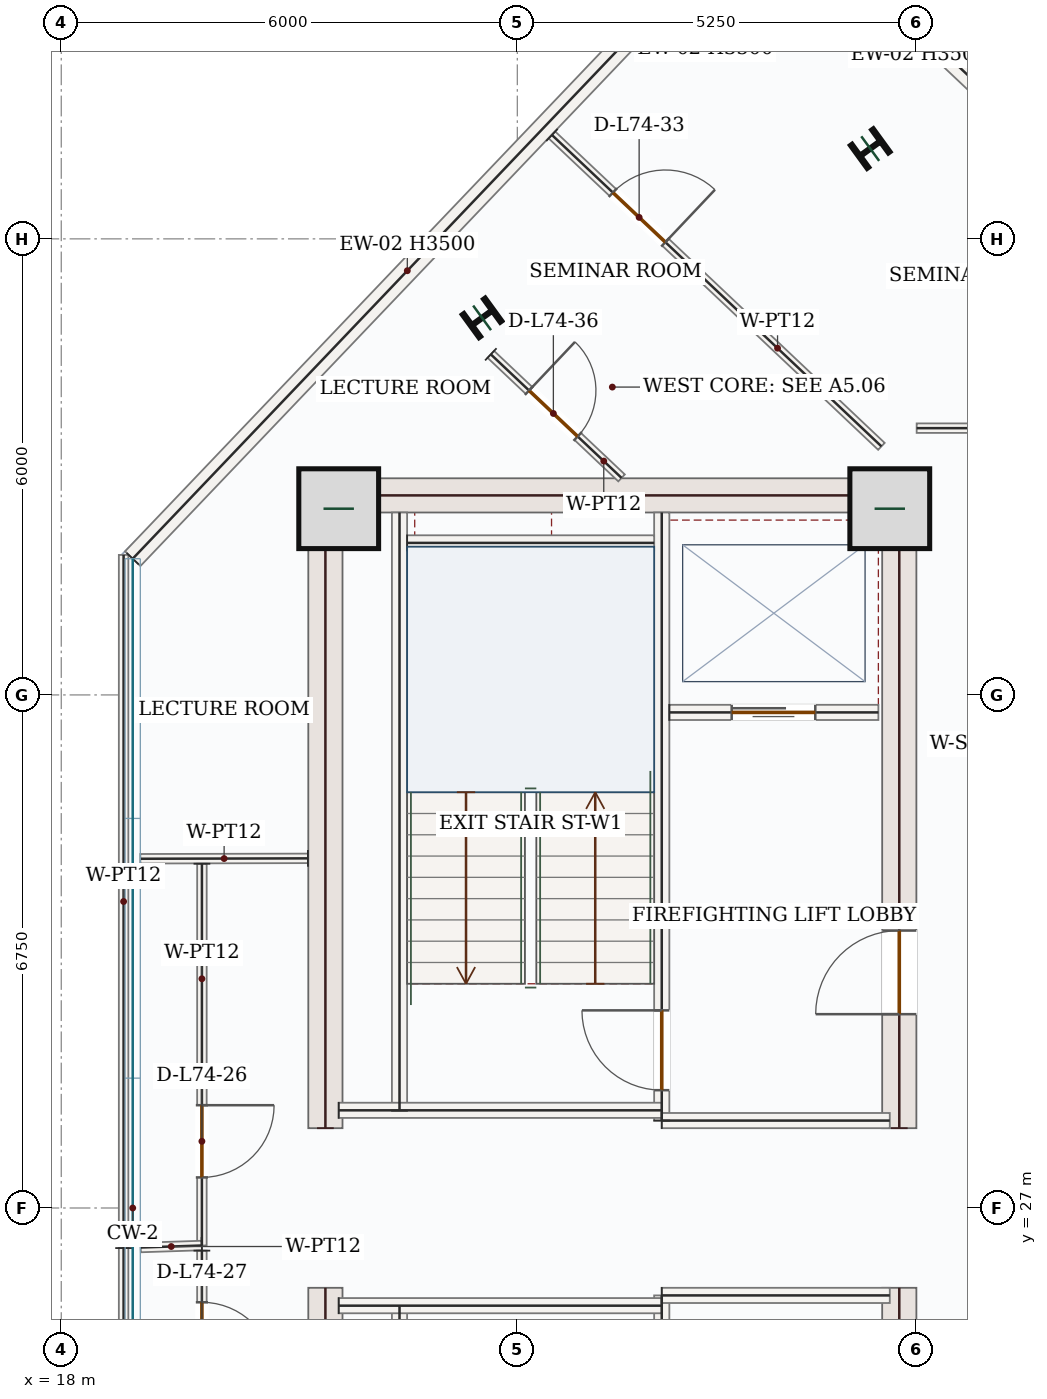
"""IFC4 building model, lengths in metres.
Left out: names, types, materials, properties, quantities, classifications, styles, units other than length and angle.
Written with IfcOpenShell. Run it as: python <this file> out.ifc"""

import sys

from ifc_helpers import new_model, si_unit, direction, frame, frame_2d, origin, origin_2d, place, context, subcontext, project, spatial, rectangle, i_section, extrude, source, transform, mapped, element, fill, save


model = new_model("IFC4")
c1 = context("Model", 3, precision=1e-05, world=origin(), true_north=direction((0.0, 1.0)))
c2 = subcontext(c1, "Body", "Model", "MODEL_VIEW")
j1 = project(units=[si_unit("LENGTHUNIT", "METRE"), si_unit("PLANEANGLEUNIT", "RADIAN")], contexts=[c1])
p1 = place(None, origin())
s1 = spatial("IfcSite", under=j1, at=p1, CompositionType="ELEMENT")
p2 = place(p1, origin())
s2 = spatial("IfcBuilding", under=s1, at=p2, CompositionType="ELEMENT")
p3 = place(p2, frame((0.0, 0.0, 306.6)))
s3 = spatial("IfcBuildingStorey", under=s2, at=p3, CompositionType="ELEMENT", Elevation=306.6)
m1 = source(origin(), c2, "Body", "SweptSolid", [
    extrude(rectangle(XDim=8.55, YDim=0.45, at=frame_2d((4.275, 0.0))), origin(), (0.0, 0.0, 1.0), 3.5),
])
for number, where, z_axis, x_axis in (
    (1, (21.475, 17.4, 0.0), (0.0, 0.0, 1.0), (0.0, 1.0, 0.0)),
    (2, (21.475, 28.05, 0.0), (0.0, 0.0, 1.0), (0.0, 1.0, 0.0)),
):
    element("IfcWall", number, at=place(p3, frame(where, z_axis=z_axis, x_axis=x_axis)), inside=s3, PredefinedType="SHEAR", context=c2, shape_type="MappedRepresentation", body=[
        mapped(m1, transform((0.0, 0.0, 0.0), x_axis=(1.0, 0.0, 0.0), y_axis=(0.0, 1.0, 0.0), z_axis=(0.0, 0.0, 1.0), scale=1.0)),
    ])
p4 = place(p3, frame((29.025, 17.4, 0.0), z_axis=(0.0, 0.0, 1.0), x_axis=(0.0, 1.0, 0.0)))
e3 = element("IfcWall", 3, at=p4, inside=s3, PredefinedType="SHEAR", context=c2, shape_type="SweptSolid", body=[
    extrude(rectangle(XDim=8.55, YDim=0.45, at=frame_2d((4.275, 0.0))), origin(), (0.0, 0.0, 1.0), 3.5),
])
p5 = place(p4, frame((6.65, 0.0, 0.0)))
e4 = element("IfcOpeningElement", 4, at=p5, cuts=e3, PredefinedType="OPENING", context=c2, shape_type="SweptSolid", body=[
    extrude(rectangle(XDim=1.1, YDim=2.2, at=frame_2d((0.55, 1.1))), frame((0.0, 0.235, 0.0), z_axis=(0.0, -1.0, 0.0), x_axis=(1.0, 0.0, 0.0)), (0.0, 0.0, 1.0), 0.47),
])
p6 = place(p4, frame((2.7, 0.0, 0.0)))
e5 = element("IfcOpeningElement", 5, at=p6, cuts=e3, PredefinedType="OPENING", context=c2, shape_type="SweptSolid", body=[
    extrude(rectangle(XDim=0.88, YDim=2.1, at=frame_2d((0.44, 1.05))), frame((0.0, 0.235, 0.0), z_axis=(0.0, -1.0, 0.0), x_axis=(1.0, 0.0, 0.0)), (0.0, 0.0, 1.0), 0.47),
])
p7 = place(p4, frame((4.6, 0.0, 0.0)))
e6 = element("IfcOpeningElement", 6, at=p7, cuts=e3, PredefinedType="OPENING", context=c2, shape_type="SweptSolid", body=[
    extrude(rectangle(XDim=0.88, YDim=2.1, at=frame_2d((0.44, 1.05))), frame((0.0, 0.235, 0.0), z_axis=(0.0, -1.0, 0.0), x_axis=(1.0, 0.0, 0.0)), (0.0, 0.0, 1.0), 0.47),
])
p8 = place(p3, frame((29.025, 28.05, 0.0), z_axis=(0.0, 0.0, 1.0), x_axis=(0.0, 1.0, 0.0)))
e7 = element("IfcWall", 7, at=p8, inside=s3, PredefinedType="SHEAR", context=c2, shape_type="SweptSolid", body=[
    extrude(rectangle(XDim=8.55, YDim=0.45, at=frame_2d((4.275, 0.0))), origin(), (0.0, 0.0, 1.0), 3.5),
])
p9 = place(p8, frame((1.5, 0.0, 0.0)))
e8 = element("IfcOpeningElement", 8, at=p9, cuts=e7, PredefinedType="OPENING", context=c2, shape_type="SweptSolid", body=[
    extrude(rectangle(XDim=1.1, YDim=2.2, at=frame_2d((0.55, 1.1))), frame((0.0, 0.235, 0.0), z_axis=(0.0, -1.0, 0.0), x_axis=(1.0, 0.0, 0.0)), (0.0, 0.0, 1.0), 0.47),
])
m2 = source(origin(), c2, "Body", "SweptSolid", [
    extrude(rectangle(XDim=7.1, YDim=0.45, at=frame_2d((3.55, 0.0))), origin(), (0.0, 0.0, 1.0), 3.5),
])
p10 = place(p3, frame((21.7, 36.375, 0.0), z_axis=(0.0, 0.0, 1.0), x_axis=(1.0, 0.0, 0.0)))
e9 = element("IfcWall", 9, at=p10, inside=s3, PredefinedType="SHEAR", context=c2, shape_type="MappedRepresentation", body=[
    mapped(m2, transform((0.0, 0.0, 0.0), x_axis=(1.0, 0.0, 0.0), y_axis=(0.0, 1.0, 0.0), z_axis=(0.0, 0.0, 1.0), scale=1.0)),
])
m3 = source(origin(), c2, "Body", "SweptSolid", [
    extrude(rectangle(XDim=1.05, YDim=1.05, at=origin_2d()), origin(), (0.0, 0.0, 1.0), 3.75),
])
for number, where, z_axis, x_axis in (
    (10, (21.65, 36.2, 0.0), (0.0, 0.0, 1.0), (1.0, 0.0, 0.0)),
    (11, (28.9, 36.2, 0.0), (0.0, 0.0, 1.0), (1.0, 0.0, 0.0)),
):
    element("IfcColumn", number, at=place(p3, frame(where, z_axis=z_axis, x_axis=x_axis)), inside=s3, PredefinedType="COLUMN", context=c2, shape_type="MappedRepresentation", body=[
        mapped(m3, transform((0.0, 0.0, 0.0), x_axis=(1.0, 0.0, 0.0), y_axis=(0.0, 1.0, 0.0), z_axis=(0.0, 0.0, 1.0), scale=1.0)),
    ])
m4 = source(origin(), c2, "Body", "SweptSolid", [
    extrude(i_section(OverallWidth=0.374, OverallDepth=0.372, WebThickness=0.016, FlangeThickness=0.026, FilletRadius=0.018, at=origin_2d()), origin(), (0.0, 0.0, 1.0), 3.75),
])
for number, where, z_axis, x_axis in (
    (12, (28.643, 40.937, 0.0), (0.0, 0.0, 1.0), (-0.588, 0.809, 0.0)),
    (13, (23.536, 38.711, 0.0), (0.0, 0.0, 1.0), (-0.588, 0.809, 0.0)),
):
    element("IfcColumn", number, at=place(p3, frame(where, z_axis=z_axis, x_axis=x_axis)), inside=s3, PredefinedType="COLUMN", context=c2, shape_type="MappedRepresentation", body=[
        mapped(m4, transform((0.0, 0.0, 0.0), x_axis=(1.0, 0.0, 0.0), y_axis=(0.0, 1.0, 0.0), z_axis=(0.0, 0.0, 1.0), scale=1.0)),
    ])
m5 = source(origin(), c2, "Body", "SweptSolid", [
    extrude(rectangle(XDim=10.47, YDim=0.28, at=frame_2d((5.235, 0.0))), origin(), (0.0, 0.0, 1.0), 3.5),
])
p11 = place(p3, frame((18.94, 35.542, 0.0), z_axis=(0.0, 0.0, 1.0), x_axis=(0.690070788875, 0.723741878256, 0.0)))
e14 = element("IfcWall", 14, at=p11, inside=s3, PredefinedType="SOLIDWALL", context=c2, shape_type="MappedRepresentation", body=[
    mapped(m5, transform((0.0, 0.0, 0.0), x_axis=(1.0, 0.0, 0.0), y_axis=(0.0, 1.0, 0.0), z_axis=(0.0, 0.0, 1.0), scale=1.0)),
])
p12 = place(p3, frame((28.568, 43.188, 0.0), z_axis=(0.0, 0.0, 1.0), x_axis=(0.726765623086, -0.686885528382, 0.0)))
e15 = element("IfcWall", 15, at=p12, inside=s3, PredefinedType="SOLIDWALL", context=c2, shape_type="SweptSolid", body=[
    extrude(rectangle(XDim=5.718, YDim=0.28, at=frame_2d((2.859, 0.0))), origin(), (0.0, 0.0, 1.0), 3.5),
])
p13 = place(p12, frame((2.109, 0.0, 0.85)))
e16 = element("IfcOpeningElement", 16, at=p13, cuts=e15, PredefinedType="OPENING", context=c2, shape_type="SweptSolid", body=[
    extrude(rectangle(XDim=1.5, YDim=1.5, at=frame_2d((0.75, 0.75))), frame((0.0, 0.15, 0.0), z_axis=(0.0, -1.0, 0.0), x_axis=(1.0, 0.0, 0.0)), (0.0, 0.0, 1.0), 0.3),
])
m6 = source(origin(), c2, "Body", "SweptSolid", [
    extrude(rectangle(XDim=7.87, YDim=0.2, at=frame_2d((3.935, 0.0))), origin(), (0.0, 0.0, 1.0), 3.5),
])
for number, where, z_axis, x_axis in (
    (17, (22.45, 17.85, 0.0), (0.0, 0.0, 1.0), (0.0, 1.0, 0.0)),
    (18, (22.45, 28.28, 0.0), (0.0, 0.0, 1.0), (0.0, 1.0, 0.0)),
):
    element("IfcWall", number, at=place(p3, frame(where, z_axis=z_axis, x_axis=x_axis)), inside=s3, PredefinedType="SOLIDWALL", context=c2, shape_type="MappedRepresentation", body=[
        mapped(m6, transform((0.0, 0.0, 0.0), x_axis=(1.0, 0.0, 0.0), y_axis=(0.0, 1.0, 0.0), z_axis=(0.0, 0.0, 1.0), scale=1.0)),
    ])
p14 = place(p3, frame((25.9, 17.85, 0.0), z_axis=(0.0, 0.0, 1.0), x_axis=(0.0, 1.0, 0.0)))
e19 = element("IfcWall", 19, at=p14, inside=s3, PredefinedType="SOLIDWALL", context=c2, shape_type="SweptSolid", body=[
    extrude(rectangle(XDim=8.0, YDim=0.2, at=frame_2d((4.0, 0.0))), origin(), (0.0, 0.0, 1.0), 3.5),
])
p15 = place(p14, frame((6.2, 0.0, 0.0)))
e20 = element("IfcOpeningElement", 20, at=p15, cuts=e19, PredefinedType="OPENING", context=c2, shape_type="SweptSolid", body=[
    extrude(rectangle(XDim=1.0, YDim=2.15, at=frame_2d((0.5, 1.075))), frame((0.0, 0.11, 0.0), z_axis=(0.0, -1.0, 0.0), x_axis=(1.0, 0.0, 0.0)), (0.0, 0.0, 1.0), 0.22),
])
p16 = place(p14, frame((0.6, 0.0, 0.0)))
e21 = element("IfcOpeningElement", 21, at=p16, cuts=e19, PredefinedType="OPENING", context=c2, shape_type="SweptSolid", body=[
    extrude(rectangle(XDim=0.88, YDim=2.1, at=frame_2d((0.44, 1.05))), frame((0.0, 0.11, 0.0), z_axis=(0.0, -1.0, 0.0), x_axis=(1.0, 0.0, 0.0)), (0.0, 0.0, 1.0), 0.22),
])
p17 = place(p3, frame((25.9, 28.15, 0.0), z_axis=(0.0, 0.0, 1.0), x_axis=(0.0, 1.0, 0.0)))
e22 = element("IfcWall", 22, at=p17, inside=s3, PredefinedType="SOLIDWALL", context=c2, shape_type="SweptSolid", body=[
    extrude(rectangle(XDim=8.0, YDim=0.2, at=frame_2d((4.0, 0.0))), origin(), (0.0, 0.0, 1.0), 3.5),
])
p18 = place(p17, frame((0.4, 0.0, 0.0)))
e23 = element("IfcOpeningElement", 23, at=p18, cuts=e22, PredefinedType="OPENING", context=c2, shape_type="SweptSolid", body=[
    extrude(rectangle(XDim=1.05, YDim=2.15, at=frame_2d((0.525, 1.075))), frame((0.0, 0.11, 0.0), z_axis=(0.0, -1.0, 0.0), x_axis=(1.0, 0.0, 0.0)), (0.0, 0.0, 1.0), 0.22),
])
m7 = source(origin(), c2, "Body", "SweptSolid", [
    extrude(rectangle(XDim=4.25, YDim=0.2, at=frame_2d((2.125, 0.0))), origin(), (0.0, 0.0, 1.0), 3.5),
])
p19 = place(p3, frame((21.65, 25.715, 0.0), z_axis=(0.0, 0.0, 1.0), x_axis=(1.0, 0.0, 0.0)))
e24 = element("IfcWall", 24, at=p19, inside=s3, PredefinedType="SOLIDWALL", context=c2, shape_type="MappedRepresentation", body=[
    mapped(m7, transform((0.0, 0.0, 0.0), x_axis=(1.0, 0.0, 0.0), y_axis=(0.0, 1.0, 0.0), z_axis=(0.0, 0.0, 1.0), scale=1.0)),
])
m8 = source(origin(), c2, "Body", "SweptSolid", [
    extrude(rectangle(XDim=3.0, YDim=0.2, at=frame_2d((1.5, 0.0))), origin(), (0.0, 0.0, 1.0), 3.5),
])
p20 = place(p3, frame((25.9, 25.85, 0.0), z_axis=(0.0, 0.0, 1.0), x_axis=(1.0, 0.0, 0.0)))
e25 = element("IfcWall", 25, at=p20, inside=s3, PredefinedType="SOLIDWALL", context=c2, shape_type="MappedRepresentation", body=[
    mapped(m8, transform((0.0, 0.0, 0.0), x_axis=(1.0, 0.0, 0.0), y_axis=(0.0, 1.0, 0.0), z_axis=(0.0, 0.0, 1.0), scale=1.0)),
])
p21 = place(p3, frame((21.65, 28.285, 0.0), z_axis=(0.0, 0.0, 1.0), x_axis=(1.0, 0.0, 0.0)))
e26 = element("IfcWall", 26, at=p21, inside=s3, PredefinedType="SOLIDWALL", context=c2, shape_type="MappedRepresentation", body=[
    mapped(m7, transform((0.0, 0.0, 0.0), x_axis=(1.0, 0.0, 0.0), y_axis=(0.0, 1.0, 0.0), z_axis=(0.0, 0.0, 1.0), scale=1.0)),
])
p22 = place(p3, frame((25.9, 28.15, 0.0), z_axis=(0.0, 0.0, 1.0), x_axis=(1.0, 0.0, 0.0)))
e27 = element("IfcWall", 27, at=p22, inside=s3, PredefinedType="SOLIDWALL", context=c2, shape_type="MappedRepresentation", body=[
    mapped(m8, transform((0.0, 0.0, 0.0), x_axis=(1.0, 0.0, 0.0), y_axis=(0.0, 1.0, 0.0), z_axis=(0.0, 0.0, 1.0), scale=1.0)),
])
m9 = source(origin(), c2, "Body", "SweptSolid", [
    extrude(rectangle(XDim=3.25, YDim=0.2, at=frame_2d((1.625, 0.0))), origin(), (0.0, 0.0, 1.0), 3.5),
])
p23 = place(p3, frame((22.55, 35.75, 0.0), z_axis=(0.0, 0.0, 1.0), x_axis=(1.0, 0.0, 0.0)))
e28 = element("IfcWall", 28, at=p23, inside=s3, PredefinedType="SOLIDWALL", context=c2, shape_type="MappedRepresentation", body=[
    mapped(m9, transform((0.0, 0.0, 0.0), x_axis=(1.0, 0.0, 0.0), y_axis=(0.0, 1.0, 0.0), z_axis=(0.0, 0.0, 1.0), scale=1.0)),
])
p24 = place(p3, frame((26.0, 33.52, 0.0), z_axis=(0.0, 0.0, 1.0), x_axis=(1.0, 0.0, 0.0)))
e29 = element("IfcWall", 29, at=p24, inside=s3, PredefinedType="SOLIDWALL", context=c2, shape_type="SweptSolid", body=[
    extrude(rectangle(XDim=2.75, YDim=0.2, at=frame_2d((1.375, 0.0))), origin(), (0.0, 0.0, 1.0), 3.5),
])
p25 = place(p24, frame((0.82, 0.0, 0.0)))
e30 = element("IfcOpeningElement", 30, at=p25, cuts=e29, PredefinedType="OPENING", context=c2, shape_type="SweptSolid", body=[
    extrude(rectangle(XDim=1.1, YDim=2.15, at=frame_2d((0.55, 1.075))), frame((0.0, 0.11, 0.0), z_axis=(0.0, -1.0, 0.0), x_axis=(1.0, 0.0, 0.0)), (0.0, 0.0, 1.0), 0.22),
])
p26 = place(p3, frame((23.651, 38.231, 0.0), z_axis=(0.0, 0.0, 1.0), x_axis=(0.726735597886, -0.686917295433, 0.0)))
e31 = element("IfcWall", 31, at=p26, inside=s3, PredefinedType="PARTITIONING", context=c2, shape_type="SweptSolid", body=[
    extrude(rectangle(XDim=2.367, YDim=0.125, at=frame_2d((1.183, 0.0))), origin(), (0.0, 0.0, 1.0), 3.5),
])
p27 = place(p26, frame((0.692, 0.0, 0.0)))
e32 = element("IfcOpeningElement", 32, at=p27, cuts=e31, PredefinedType="OPENING", context=c2, shape_type="SweptSolid", body=[
    extrude(rectangle(XDim=0.88, YDim=2.1, at=frame_2d((0.44, 1.05))), frame((0.0, 0.073, 0.0), z_axis=(0.0, -1.0, 0.0), x_axis=(1.0, 0.0, 0.0)), (0.0, 0.0, 1.0), 0.145),
])
p28 = place(p3, frame((24.456, 41.117, 0.0), z_axis=(0.0, 0.0, 1.0), x_axis=(0.726761082497, -0.686890332562, 0.0)))
e33 = element("IfcWall", 33, at=p28, inside=s3, PredefinedType="PARTITIONING", context=c2, shape_type="SweptSolid", body=[
    extrude(rectangle(XDim=5.964, YDim=0.125, at=frame_2d((2.982, 0.0))), origin(), (0.0, 0.0, 1.0), 3.5),
])
p29 = place(p28, frame((1.103, 0.0, 0.0)))
e34 = element("IfcOpeningElement", 34, at=p29, cuts=e33, PredefinedType="OPENING", context=c2, shape_type="SweptSolid", body=[
    extrude(rectangle(XDim=0.95, YDim=2.15, at=frame_2d((0.475, 1.075))), frame((0.0, 0.073, 0.0), z_axis=(0.0, -1.0, 0.0), x_axis=(1.0, 0.0, 0.0)), (0.0, 0.0, 1.0), 0.145),
])
m10 = source(origin(), c2, "Body", "SweptSolid", [
    extrude(rectangle(XDim=2.205, YDim=0.125, at=frame_2d((1.103, 0.0))), origin(), (0.0, 0.0, 1.0), 3.5),
])
p30 = place(p3, frame((21.245, 31.6, 0.0), z_axis=(0.0, 0.0, 1.0), x_axis=(-0.999997033492, -0.002435776654, 0.0)))
e35 = element("IfcWall", 35, at=p30, inside=s3, PredefinedType="PARTITIONING", context=c2, shape_type="MappedRepresentation", body=[
    mapped(m10, transform((0.0, 0.0, 0.0), x_axis=(1.0, 0.0, 0.0), y_axis=(0.0, 1.0, 0.0), z_axis=(0.0, 0.0, 1.0), scale=1.0)),
])
p31 = place(p3, frame((19.851, 31.529, 0.0), z_axis=(0.0, 0.0, 1.0), x_axis=(-9.7219521e-05, -0.999999995274, 0.0)))
e36 = element("IfcWall", 36, at=p31, inside=s3, PredefinedType="PARTITIONING", context=c2, shape_type="SweptSolid", body=[
    extrude(rectangle(XDim=5.022, YDim=0.125, at=frame_2d((2.511, 0.0))), origin(), (0.0, 0.0, 1.0), 3.5),
])
p32 = place(p31, frame((3.177, 0.0, 0.0)))
e37 = element("IfcOpeningElement", 37, at=p32, cuts=e36, PredefinedType="OPENING", context=c2, shape_type="SweptSolid", body=[
    extrude(rectangle(XDim=0.95, YDim=2.15, at=frame_2d((0.475, 1.075))), frame((0.0, 0.073, 0.0), z_axis=(0.0, -1.0, 0.0), x_axis=(1.0, 0.0, 0.0)), (0.0, 0.0, 1.0), 0.145),
])
m11 = source(origin(), c2, "Body", "SweptSolid", [
    extrude(rectangle(XDim=0.804, YDim=0.125, at=frame_2d((0.402, 0.0))), origin(), (0.0, 0.0, 1.0), 3.5),
])
p33 = place(p3, frame((19.849, 26.507, 0.0), z_axis=(0.0, 0.0, 1.0), x_axis=(-0.999452627665, -0.03308239794, 0.0)))
e38 = element("IfcWall", 38, at=p33, inside=s3, PredefinedType="PARTITIONING", context=c2, shape_type="MappedRepresentation", body=[
    mapped(m11, transform((0.0, 0.0, 0.0), x_axis=(1.0, 0.0, 0.0), y_axis=(0.0, 1.0, 0.0), z_axis=(0.0, 0.0, 1.0), scale=1.0)),
])
m12 = source(origin(), c2, "Body", "SweptSolid", [
    extrude(rectangle(XDim=9.119, YDim=0.125, at=frame_2d((4.56, 0.0))), origin(), (0.0, 0.0, 1.0), 3.5),
])
p34 = place(p3, frame((18.82, 26.473, 0.0), z_axis=(0.0, 0.0, 1.0), x_axis=(0.0, 1.0, 0.0)))
e39 = element("IfcWall", 39, at=p34, inside=s3, PredefinedType="PARTITIONING", context=c2, shape_type="MappedRepresentation", body=[
    mapped(m12, transform((0.0, 0.0, 0.0), x_axis=(1.0, 0.0, 0.0), y_axis=(0.0, 1.0, 0.0), z_axis=(0.0, 0.0, 1.0), scale=1.0)),
])
p35 = place(p3, frame((19.85, 26.439, 0.0), z_axis=(0.0, 0.0, 1.0), x_axis=(0.000241837961, -0.999999970757, 0.0)))
e40 = element("IfcWall", 40, at=p35, inside=s3, PredefinedType="PARTITIONING", context=c2, shape_type="SweptSolid", body=[
    extrude(rectangle(XDim=4.038, YDim=0.125, at=frame_2d((2.019, 0.0))), origin(), (0.0, 0.0, 1.0), 3.5),
])
p36 = place(p35, frame((0.679, 0.0, 0.0)))
e41 = element("IfcOpeningElement", 41, at=p36, cuts=e40, PredefinedType="OPENING", context=c2, shape_type="SweptSolid", body=[
    extrude(rectangle(XDim=0.95, YDim=2.15, at=frame_2d((0.475, 1.075))), frame((0.0, 0.073, 0.0), z_axis=(0.0, -1.0, 0.0), x_axis=(1.0, 0.0, 0.0)), (0.0, 0.0, 1.0), 0.145),
])
m13 = source(origin(), c2, "Body", "SweptSolid", [
    extrude(rectangle(XDim=8.064, YDim=0.125, at=frame_2d((4.032, 0.0))), origin(), (0.0, 0.0, 1.0), 3.5),
])
p37 = place(p3, frame((18.82, 18.408, 0.0), z_axis=(0.0, 0.0, 1.0), x_axis=(0.0, 1.0, 0.0)))
e42 = element("IfcWall", 42, at=p37, inside=s3, PredefinedType="PARTITIONING", context=c2, shape_type="MappedRepresentation", body=[
    mapped(m13, transform((0.0, 0.0, 0.0), x_axis=(1.0, 0.0, 0.0), y_axis=(0.0, 1.0, 0.0), z_axis=(0.0, 0.0, 1.0), scale=1.0)),
])
p38 = place(p3, frame((35.653, 37.26, 0.0), z_axis=(0.0, 0.0, 1.0), x_axis=(-0.999999997089, -7.6303842e-05, 0.0)))
e43 = element("IfcWall", 43, at=p38, inside=s3, PredefinedType="PARTITIONING", context=c2, shape_type="SweptSolid", body=[
    extrude(rectangle(XDim=6.399, YDim=0.125, at=frame_2d((3.2, 0.0))), origin(), (0.0, 0.0, 1.0), 3.5),
])
p39 = place(p38, frame((1.199, 0.0, 0.0)))
e44 = element("IfcOpeningElement", 44, at=p39, cuts=e43, PredefinedType="OPENING", context=c2, shape_type="SweptSolid", body=[
    extrude(rectangle(XDim=0.95, YDim=2.15, at=frame_2d((0.475, 1.075))), frame((0.0, 0.073, 0.0), z_axis=(0.0, -1.0, 0.0), x_axis=(1.0, 0.0, 0.0)), (0.0, 0.0, 1.0), 0.145),
])
m14 = source(origin(), c2, "Body", "SweptSolid", [
    extrude(rectangle(XDim=1.05, YDim=2.15, at=frame_2d((0.525, 1.075))), frame((0.0, 0.025, 0.0), z_axis=(0.0, -1.0, 0.0), x_axis=(1.0, 0.0, 0.0)), (0.0, 0.0, 1.0), 0.05),
])
p40 = place(p18, origin())
e45 = element("IfcDoor", 45, at=p40, inside=s3, OperationType="SINGLE_SWING_RIGHT", PredefinedType="DOOR", context=c2, shape_type="MappedRepresentation", body=[
    mapped(m14, transform((0.0, 0.0, 0.0), x_axis=(1.0, 0.0, 0.0), y_axis=(0.0, 1.0, 0.0), z_axis=(0.0, 0.0, 1.0), scale=1.0)),
])
fill(e23, e45)
m15 = source(origin(), c2, "Body", "SweptSolid", [
    extrude(rectangle(XDim=1.1, YDim=2.15, at=frame_2d((0.55, 1.075))), frame((0.0, 0.025, 0.0), z_axis=(0.0, -1.0, 0.0), x_axis=(1.0, 0.0, 0.0)), (0.0, 0.0, 1.0), 0.05),
])
p41 = place(p25, origin())
e46 = element("IfcDoor", 46, at=p41, inside=s3, OperationType="DOUBLE_DOOR_SLIDING", PredefinedType="DOOR", context=c2, shape_type="MappedRepresentation", body=[
    mapped(m15, transform((0.0, 0.0, 0.0), x_axis=(1.0, 0.0, 0.0), y_axis=(0.0, 1.0, 0.0), z_axis=(0.0, 0.0, 1.0), scale=1.0)),
])
fill(e30, e46)
m16 = source(origin(), c2, "Body", "SweptSolid", [
    extrude(rectangle(XDim=1.1, YDim=2.2, at=frame_2d((0.55, 1.1))), frame((0.0, 0.025, 0.0), z_axis=(0.0, -1.0, 0.0), x_axis=(1.0, 0.0, 0.0)), (0.0, 0.0, 1.0), 0.05),
])
p42 = place(p9, origin())
e47 = element("IfcDoor", 47, at=p42, inside=s3, OperationType="SINGLE_SWING_LEFT", PredefinedType="DOOR", context=c2, shape_type="MappedRepresentation", body=[
    mapped(m16, transform((0.0, 0.0, 0.0), x_axis=(1.0, 0.0, 0.0), y_axis=(0.0, 1.0, 0.0), z_axis=(0.0, 0.0, 1.0), scale=1.0)),
])
fill(e8, e47)
m17 = source(origin(), c2, "Body", "SweptSolid", [
    extrude(rectangle(XDim=0.95, YDim=2.15, at=frame_2d((0.475, 1.075))), frame((0.0, 0.025, 0.0), z_axis=(0.0, -1.0, 0.0), x_axis=(1.0, 0.0, 0.0)), (0.0, 0.0, 1.0), 0.05),
])
p43 = place(p32, origin())
e48 = element("IfcDoor", 48, at=p43, inside=s3, OperationType="SINGLE_SWING_LEFT", PredefinedType="DOOR", context=c2, shape_type="MappedRepresentation", body=[
    mapped(m17, transform((0.0, 0.0, 0.0), x_axis=(1.0, 0.0, 0.0), y_axis=(0.0, 1.0, 0.0), z_axis=(0.0, 0.0, 1.0), scale=1.0)),
])
fill(e37, e48)
p44 = place(p36, origin())
e49 = element("IfcDoor", 49, at=p44, inside=s3, OperationType="SINGLE_SWING_RIGHT", PredefinedType="DOOR", context=c2, shape_type="MappedRepresentation", body=[
    mapped(m17, transform((0.0, 0.0, 0.0), x_axis=(1.0, 0.0, 0.0), y_axis=(0.0, 1.0, 0.0), z_axis=(0.0, 0.0, 1.0), scale=1.0)),
])
fill(e41, e49)
p45 = place(p29, origin())
e50 = element("IfcDoor", 50, at=p45, inside=s3, OperationType="SINGLE_SWING_RIGHT", PredefinedType="DOOR", context=c2, shape_type="MappedRepresentation", body=[
    mapped(m17, transform((0.0, 0.0, 0.0), x_axis=(1.0, 0.0, 0.0), y_axis=(0.0, 1.0, 0.0), z_axis=(0.0, 0.0, 1.0), scale=1.0)),
])
fill(e34, e50)
m18 = source(origin(), c2, "Body", "SweptSolid", [
    extrude(rectangle(XDim=0.88, YDim=2.1, at=frame_2d((0.44, 1.05))), frame((0.0, 0.025, 0.0), z_axis=(0.0, -1.0, 0.0), x_axis=(1.0, 0.0, 0.0)), (0.0, 0.0, 1.0), 0.05),
])
p46 = place(p27, origin())
e51 = element("IfcDoor", 51, at=p46, inside=s3, OperationType="SINGLE_SWING_LEFT", PredefinedType="DOOR", context=c2, shape_type="MappedRepresentation", body=[
    mapped(m18, transform((0.0, 0.0, 0.0), x_axis=(1.0, 0.0, 0.0), y_axis=(0.0, 1.0, 0.0), z_axis=(0.0, 0.0, 1.0), scale=1.0)),
])
fill(e32, e51)
save(model, sys.argv[1])
